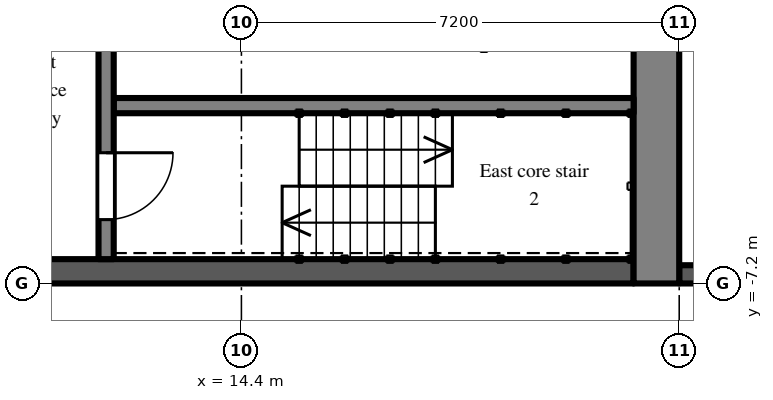
"""IFC4 building model, lengths in metres.
Left out: names, types, materials, properties, quantities, classifications, styles, units other than length and angle.
Written with IfcOpenShell. Run it as: python <this file> out.ifc"""

import sys

from ifc_helpers import new_model, si_unit, direction, frame, frame_2d, origin, place, context, subcontext, project, spatial, rectangle, extrude, element, fill, save


model = new_model("IFC4")
c1 = context("Model", 3, precision=1e-05, world=origin(), true_north=direction((0.0, 1.0)))
c2 = subcontext(c1, "Body", "Model", "MODEL_VIEW")
j1 = project(units=[si_unit("LENGTHUNIT", "METRE"), si_unit("PLANEANGLEUNIT", "RADIAN")], contexts=[c1])
p1 = place(None, origin())
s1 = spatial("IfcSite", under=j1, at=p1, CompositionType="ELEMENT")
p2 = place(p1, origin())
s2 = spatial("IfcBuilding", under=s1, at=p2, CompositionType="ELEMENT")
p3 = place(p2, frame((0.0, 0.0, 188.7)))
s3 = spatial("IfcBuildingStorey", under=s2, at=p3, CompositionType="ELEMENT", Elevation=188.7)
p4 = place(p3, frame((21.6, -7.05, 0.0), z_axis=(0.0, 0.0, 1.0), x_axis=(1.0, 0.0, 0.0)))
e1 = element("IfcWall", 1, at=p4, inside=s3, PredefinedType="SOLIDWALL", context=c2, shape_type="SweptSolid", body=[
    extrude(rectangle(XDim=2.7, YDim=0.3, at=frame_2d((1.35, 0.0))), origin(), (0.0, 0.0, 1.0), 2.2),
])
p5 = place(p4, frame((0.75, 0.0, 0.2)))
e2 = element("IfcOpeningElement", 2, at=p5, cuts=e1, PredefinedType="OPENING", context=c2, shape_type="SweptSolid", body=[
    extrude(rectangle(XDim=1.2, YDim=1.85, at=frame_2d((0.6, 0.925))), frame((0.0, 0.16, 0.0), z_axis=(0.0, -1.0, 0.0), x_axis=(1.0, 0.0, 0.0)), (0.0, 0.0, 1.0), 0.32),
])
p6 = place(p3, frame((21.225, -7.2, 0.0), z_axis=(0.0, 0.0, 1.0), x_axis=(0.0, 1.0, 0.0)))
e3 = element("IfcWall", 3, at=p6, inside=s3, PredefinedType="SHEAR", context=c2, shape_type="SweptSolid", body=[
    extrude(rectangle(XDim=14.4, YDim=0.75, at=frame_2d((7.2, 0.0))), origin(), (0.0, 0.0, 1.0), 2.6),
])
p7 = place(p6, frame((6.0, 0.0, 0.0)))
e4 = element("IfcOpeningElement", 4, at=p7, cuts=e3, PredefinedType="OPENING", context=c2, shape_type="SweptSolid", body=[
    extrude(rectangle(XDim=2.4, YDim=2.2, at=frame_2d((1.2, 1.1))), frame((0.0, 0.385, 0.0), z_axis=(0.0, -1.0, 0.0), x_axis=(1.0, 0.0, 0.0)), (0.0, 0.0, 1.0), 0.77),
])
p8 = place(p3, frame((7.9, -7.0, 0.0), z_axis=(0.0, 0.0, 1.0), x_axis=(1.0, 0.0, 0.0)))
e5 = element("IfcWall", 5, at=p8, inside=s3, PredefinedType="SHEAR", context=c2, shape_type="SweptSolid", body=[
    extrude(rectangle(XDim=12.95, YDim=0.4, at=frame_2d((6.475, 0.0))), origin(), (0.0, 0.0, 1.0), 2.6),
])
p9 = place(p3, frame((12.3, -4.275, 0.0), z_axis=(0.0, 0.0, 1.0), x_axis=(1.0, 0.0, 0.0)))
e6 = element("IfcWall", 6, at=p9, inside=s3, PredefinedType="SHEAR", context=c2, shape_type="SweptSolid", body=[
    extrude(rectangle(XDim=8.55, YDim=0.25, at=frame_2d((4.275, 0.0))), origin(), (0.0, 0.0, 1.0), 2.6),
])
p10 = place(p3, frame((12.175, -2.05, 0.0), z_axis=(0.0, 0.0, 1.0), x_axis=(0.0, -1.0, 0.0)))
e7 = element("IfcWall", 7, at=p10, inside=s3, PredefinedType="SHEAR", context=c2, shape_type="SweptSolid", body=[
    extrude(rectangle(XDim=4.75, YDim=0.25, at=frame_2d((2.375, 0.0))), origin(), (0.0, 0.0, 1.0), 2.6),
])
p11 = place(p10, frame((3.0, 0.0, 0.0)))
e8 = element("IfcOpeningElement", 8, at=p11, cuts=e7, PredefinedType="OPENING", context=c2, shape_type="SweptSolid", body=[
    extrude(rectangle(XDim=1.1, YDim=2.1, at=frame_2d((0.55, 1.05))), frame((0.0, 0.135, 0.0), z_axis=(0.0, -1.0, 0.0), x_axis=(1.0, 0.0, 0.0)), (0.0, 0.0, 1.0), 0.27),
])
p12 = place(p11, origin())
e9 = element("IfcDoor", 9, at=p12, inside=s3, OperationType="SINGLE_SWING_LEFT", PredefinedType="DOOR", context=c2, shape_type="SweptSolid", body=[
    extrude(rectangle(XDim=1.1, YDim=2.1, at=frame_2d((0.55, 1.05))), frame((0.0, 0.025, 0.0), z_axis=(0.0, -1.0, 0.0), x_axis=(1.0, 0.0, 0.0)), (0.0, 0.0, 1.0), 0.05),
])
fill(e8, e9)
save(model, sys.argv[1])
